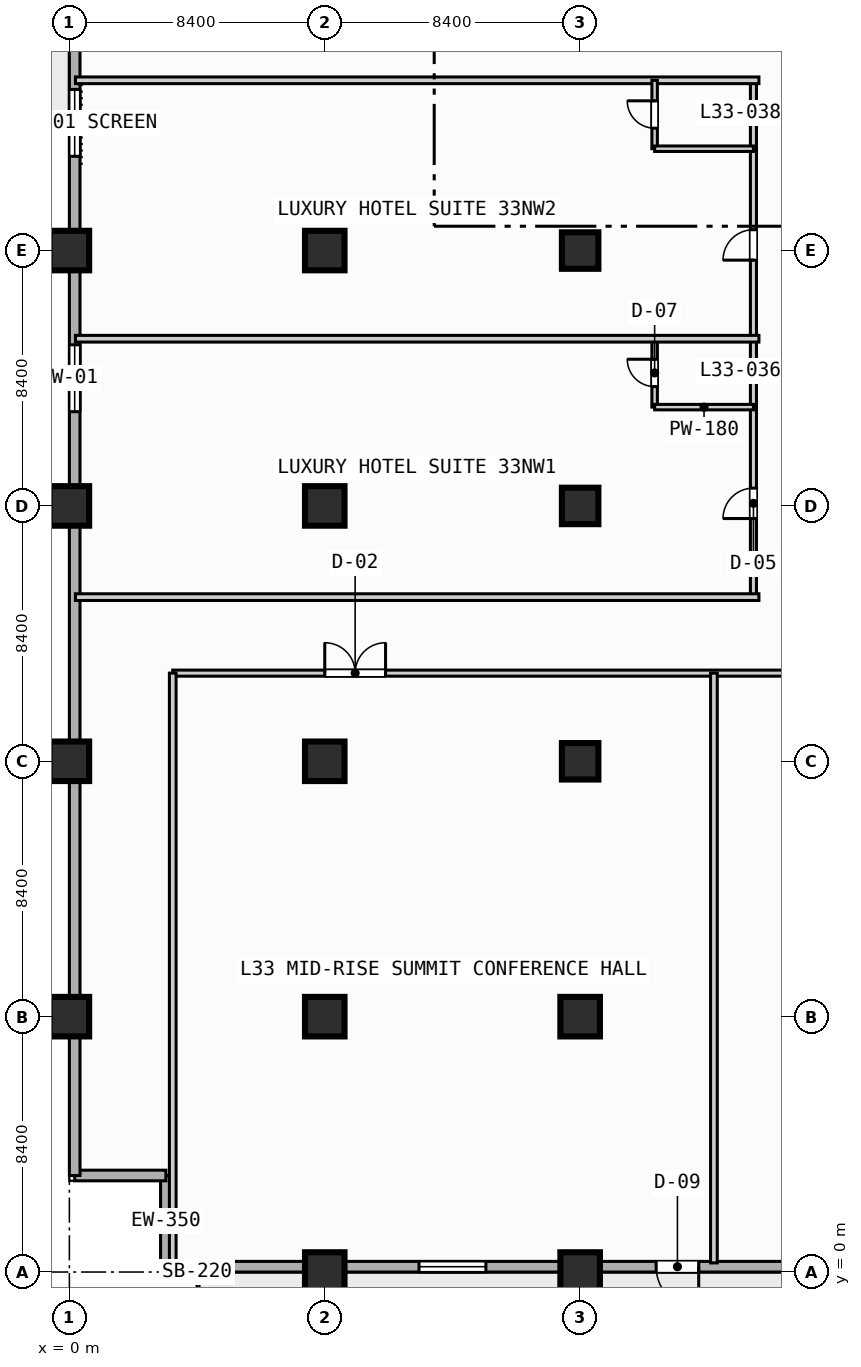
"""IFC4 building model, lengths in metres.
Left out: names, types, materials, properties, quantities, classifications, styles, units other than length and angle.
Written with IfcOpenShell. Run it as: python <this file> out.ifc"""

import sys

from ifc_helpers import new_model, si_unit, direction, frame, frame_2d, origin, origin_2d, place, context, subcontext, project, spatial, rectangle, extrude, element, fill, save


model = new_model("IFC4")
c1 = context("Model", 3, precision=1e-05, world=origin(), true_north=direction((0.0, 1.0)))
c2 = subcontext(c1, "Body", "Model", "MODEL_VIEW")
j1 = project(units=[si_unit("LENGTHUNIT", "METRE"), si_unit("PLANEANGLEUNIT", "RADIAN")], contexts=[c1])
p1 = place(None, origin())
s1 = spatial("IfcSite", under=j1, at=p1, CompositionType="ELEMENT")
p2 = place(p1, origin())
s2 = spatial("IfcBuilding", under=s1, at=p2, CompositionType="ELEMENT")
p3 = place(p2, frame((0.0, 0.0, 138.0)))
s3 = spatial("IfcBuildingStorey", under=s2, at=p3, CompositionType="ELEMENT", Elevation=138.0)
for number, where, z_axis, x_axis in (
    (1, (0.0, 8.4, 0.0), (0.0, 0.0, 1.0), (1.0, 0.0, 0.0)),
    (2, (0.0, 16.8, 0.0), (0.0, 0.0, 1.0), (1.0, 0.0, 0.0)),
    (3, (0.0, 25.2, 0.0), (0.0, 0.0, 1.0), (1.0, 0.0, 0.0)),
    (4, (0.0, 33.6, 0.0), (0.0, 0.0, 1.0), (1.0, 0.0, 0.0)),
    (5, (8.4, 0.0, 0.0), (0.0, 0.0, 1.0), (1.0, 0.0, 0.0)),
    (6, (8.4, 8.4, 0.0), (0.0, 0.0, 1.0), (1.0, 0.0, 0.0)),
    (7, (8.4, 16.8, 0.0), (0.0, 0.0, 1.0), (1.0, 0.0, 0.0)),
    (8, (8.4, 25.2, 0.0), (0.0, 0.0, 1.0), (1.0, 0.0, 0.0)),
    (9, (8.4, 33.6, 0.0), (0.0, 0.0, 1.0), (1.0, 0.0, 0.0)),
    (10, (16.8, 0.0, 0.0), (0.0, 0.0, 1.0), (1.0, 0.0, 0.0)),
    (11, (16.8, 8.4, 0.0), (0.0, 0.0, 1.0), (1.0, 0.0, 0.0)),
):
    element("IfcColumn", number, at=place(p3, frame(where, z_axis=z_axis, x_axis=x_axis)), inside=s3, PredefinedType="COLUMN", context=c2, shape_type="SweptSolid", body=[
        extrude(rectangle(XDim=1.3, YDim=1.3, at=origin_2d()), origin(), (0.0, 0.0, 1.0), 3.8),
    ])
for number, where, z_axis, x_axis in (
    (12, (16.8, 16.8, 0.0), (0.0, 0.0, 1.0), (1.0, 0.0, 0.0)),
    (13, (16.8, 25.2, 0.0), (0.0, 0.0, 1.0), (1.0, 0.0, 0.0)),
    (14, (16.8, 33.6, 0.0), (0.0, 0.0, 1.0), (1.0, 0.0, 0.0)),
):
    element("IfcColumn", number, at=place(p3, frame(where, z_axis=z_axis, x_axis=x_axis)), inside=s3, PredefinedType="COLUMN", context=c2, shape_type="SweptSolid", body=[
        extrude(rectangle(XDim=1.2, YDim=1.2, at=origin_2d()), origin(), (0.0, 0.0, 1.0), 3.8),
    ])
for number, where, z_axis, x_axis in (
    (15, (3.175, 0.175, 0.0), (0.0, 0.0, 1.0), (0.0, 1.0, 0.0)),
    (16, (3.175, 3.175, 0.0), (0.0, 0.0, 1.0), (-1.0, 0.0, 0.0)),
):
    element("IfcWall", number, at=place(p3, frame(where, z_axis=z_axis, x_axis=x_axis)), inside=s3, PredefinedType="STANDARD", context=c2, shape_type="SweptSolid", body=[
        extrude(rectangle(XDim=3.0, YDim=0.35, at=frame_2d((1.5, 0.0))), origin(), (0.0, 0.0, 1.0), 3.55),
    ])
p4 = place(p3, frame((0.175, 3.175, 0.0), z_axis=(0.0, 0.0, 1.0), x_axis=(0.0, 1.0, 0.0)))
e17 = element("IfcWall", 17, at=p4, inside=s3, PredefinedType="STANDARD", context=c2, shape_type="SweptSolid", body=[
    extrude(rectangle(XDim=86.05, YDim=0.35, at=frame_2d((43.025, 0.0))), origin(), (0.0, 0.0, 1.0), 3.55),
])
p5 = place(p4, frame((42.325, 0.0, 0.0)))
e18 = element("IfcOpeningElement", 18, at=p5, cuts=e17, PredefinedType="OPENING", context=c2, shape_type="SweptSolid", body=[
    extrude(rectangle(XDim=1.4, YDim=2.2, at=frame_2d((0.7, 1.1))), frame((0.0, 0.185, 0.0), z_axis=(0.0, -1.0, 0.0), x_axis=(1.0, 0.0, 0.0)), (0.0, 0.0, 1.0), 0.37),
])
p6 = place(p4, frame((25.125, 0.0, 0.85)))
e19 = element("IfcOpeningElement", 19, at=p6, cuts=e17, PredefinedType="OPENING", context=c2, shape_type="SweptSolid", body=[
    extrude(rectangle(XDim=2.2, YDim=1.8, at=frame_2d((1.1, 0.9))), frame((0.0, 0.185, 0.0), z_axis=(0.0, -1.0, 0.0), x_axis=(1.0, 0.0, 0.0)), (0.0, 0.0, 1.0), 0.37),
])
p7 = place(p4, frame((33.525, 0.0, 0.85)))
e20 = element("IfcOpeningElement", 20, at=p7, cuts=e17, PredefinedType="OPENING", context=c2, shape_type="SweptSolid", body=[
    extrude(rectangle(XDim=2.2, YDim=1.8, at=frame_2d((1.1, 0.9))), frame((0.0, 0.185, 0.0), z_axis=(0.0, -1.0, 0.0), x_axis=(1.0, 0.0, 0.0)), (0.0, 0.0, 1.0), 0.37),
])
p8 = place(p3, frame((72.425, 0.175, 0.0), z_axis=(0.0, 0.0, 1.0), x_axis=(-1.0, 0.0, 0.0)))
e21 = element("IfcWall", 21, at=p8, inside=s3, PredefinedType="STANDARD", context=c2, shape_type="SweptSolid", body=[
    extrude(rectangle(XDim=69.25, YDim=0.35, at=frame_2d((34.625, 0.0))), origin(), (0.0, 0.0, 1.0), 3.55),
])
p9 = place(p8, frame((51.725, 0.0, 0.0)))
e22 = element("IfcOpeningElement", 22, at=p9, cuts=e21, PredefinedType="OPENING", context=c2, shape_type="SweptSolid", body=[
    extrude(rectangle(XDim=1.4, YDim=2.2, at=frame_2d((0.7, 1.1))), frame((0.0, 0.185, 0.0), z_axis=(0.0, -1.0, 0.0), x_axis=(1.0, 0.0, 0.0)), (0.0, 0.0, 1.0), 0.37),
])
p10 = place(p8, frame((58.725, 0.0, 0.85)))
e23 = element("IfcOpeningElement", 23, at=p10, cuts=e21, PredefinedType="OPENING", context=c2, shape_type="SweptSolid", body=[
    extrude(rectangle(XDim=2.2, YDim=1.8, at=frame_2d((1.1, 0.9))), frame((0.0, 0.185, 0.0), z_axis=(0.0, -1.0, 0.0), x_axis=(1.0, 0.0, 0.0)), (0.0, 0.0, 1.0), 0.37),
])
p11 = place(p8, frame((41.925, 0.0, 0.85)))
e24 = element("IfcOpeningElement", 24, at=p11, cuts=e21, PredefinedType="OPENING", context=c2, shape_type="SweptSolid", body=[
    extrude(rectangle(XDim=2.2, YDim=1.8, at=frame_2d((1.1, 0.9))), frame((0.0, 0.185, 0.0), z_axis=(0.0, -1.0, 0.0), x_axis=(1.0, 0.0, 0.0)), (0.0, 0.0, 1.0), 0.37),
])
p12 = place(p8, frame((33.525, 0.0, 0.85)))
e25 = element("IfcOpeningElement", 25, at=p12, cuts=e21, PredefinedType="OPENING", context=c2, shape_type="SweptSolid", body=[
    extrude(rectangle(XDim=2.2, YDim=1.8, at=frame_2d((1.1, 0.9))), frame((0.0, 0.185, 0.0), z_axis=(0.0, -1.0, 0.0), x_axis=(1.0, 0.0, 0.0)), (0.0, 0.0, 1.0), 0.37),
])
p13 = place(p8, frame((25.125, 0.0, 0.85)))
e26 = element("IfcOpeningElement", 26, at=p13, cuts=e21, PredefinedType="OPENING", context=c2, shape_type="SweptSolid", body=[
    extrude(rectangle(XDim=2.2, YDim=1.8, at=frame_2d((1.1, 0.9))), frame((0.0, 0.185, 0.0), z_axis=(0.0, -1.0, 0.0), x_axis=(1.0, 0.0, 0.0)), (0.0, 0.0, 1.0), 0.37),
])
p14 = place(p3, frame((3.4, 19.7, 0.0), z_axis=(0.0, 0.0, 1.0), x_axis=(1.0, 0.0, 0.0)))
e27 = element("IfcWall", 27, at=p14, inside=s3, PredefinedType="PARTITIONING", context=c2, shape_type="SweptSolid", body=[
    extrude(rectangle(XDim=35.8, YDim=0.2, at=frame_2d((17.9, 0.0))), origin(), (0.0, 0.0, 1.0), 3.55),
])
p15 = place(p14, frame((5.0, 0.0, 0.0)))
e28 = element("IfcOpeningElement", 28, at=p15, cuts=e27, PredefinedType="OPENING", context=c2, shape_type="SweptSolid", body=[
    extrude(rectangle(XDim=2.0, YDim=2.15, at=frame_2d((1.0, 1.075))), frame((0.0, 0.11, 0.0), z_axis=(0.0, -1.0, 0.0), x_axis=(1.0, 0.0, 0.0)), (0.0, 0.0, 1.0), 0.22),
])
p16 = place(p14, frame((22.0, 0.0, 0.0)))
e29 = element("IfcOpeningElement", 29, at=p16, cuts=e27, PredefinedType="OPENING", context=c2, shape_type="SweptSolid", body=[
    extrude(rectangle(XDim=2.0, YDim=2.15, at=frame_2d((1.0, 1.075))), frame((0.0, 0.11, 0.0), z_axis=(0.0, -1.0, 0.0), x_axis=(1.0, 0.0, 0.0)), (0.0, 0.0, 1.0), 0.22),
])
for number, where, z_axis, x_axis in (
    (30, (3.4, 0.3, 0.0), (0.0, 0.0, 1.0), (0.0, 1.0, 0.0)),
    (31, (21.2, 0.3, 0.0), (0.0, 0.0, 1.0), (0.0, 1.0, 0.0)),
):
    element("IfcWall", number, at=place(p3, frame(where, z_axis=z_axis, x_axis=x_axis)), inside=s3, PredefinedType="PARTITIONING", context=c2, shape_type="SweptSolid", body=[
        extrude(rectangle(XDim=19.4, YDim=0.22, at=frame_2d((9.7, 0.0))), origin(), (0.0, 0.0, 1.0), 3.55),
    ])
p17 = place(p3, frame((22.5, 22.2, 0.0), z_axis=(0.0, 0.0, 1.0), x_axis=(0.0, 1.0, 0.0)))
e32 = element("IfcWall", 32, at=p17, inside=s3, PredefinedType="PARTITIONING", context=c2, shape_type="SweptSolid", body=[
    extrude(rectangle(XDim=17.0, YDim=0.2, at=frame_2d((8.5, 0.0))), origin(), (0.0, 0.0, 1.0), 3.55),
])
p18 = place(p17, frame((2.585, 0.0, 0.0)))
e33 = element("IfcOpeningElement", 33, at=p18, cuts=e32, PredefinedType="OPENING", context=c2, shape_type="SweptSolid", body=[
    extrude(rectangle(XDim=1.0, YDim=2.15, at=frame_2d((0.5, 1.075))), frame((0.0, 0.11, 0.0), z_axis=(0.0, -1.0, 0.0), x_axis=(1.0, 0.0, 0.0)), (0.0, 0.0, 1.0), 0.22),
])
p19 = place(p17, frame((11.085, 0.0, 0.0)))
e34 = element("IfcOpeningElement", 34, at=p19, cuts=e32, PredefinedType="OPENING", context=c2, shape_type="SweptSolid", body=[
    extrude(rectangle(XDim=1.0, YDim=2.15, at=frame_2d((0.5, 1.075))), frame((0.0, 0.11, 0.0), z_axis=(0.0, -1.0, 0.0), x_axis=(1.0, 0.0, 0.0)), (0.0, 0.0, 1.0), 0.22),
])
p20 = place(p3, frame((0.2, 22.2, 0.0), z_axis=(0.0, 0.0, 1.0), x_axis=(1.0, 0.0, 0.0)))
e35 = element("IfcWall", 35, at=p20, inside=s3, PredefinedType="PARTITIONING", context=c2, shape_type="SweptSolid", body=[
    extrude(rectangle(XDim=22.48, YDim=0.22, at=frame_2d((11.24, 0.0))), origin(), (0.0, 0.0, 1.0), 3.55),
])
p21 = place(p3, frame((19.25, 28.45, 0.0), z_axis=(0.0, 0.0, 1.0), x_axis=(0.0, 1.0, 0.0)))
e36 = element("IfcWall", 36, at=p21, inside=s3, PredefinedType="PLUMBINGWALL", context=c2, shape_type="SweptSolid", body=[
    extrude(rectangle(XDim=2.25, YDim=0.18, at=frame_2d((1.125, 0.0))), origin(), (0.0, 0.0, 1.0), 3.55),
])
p22 = place(p21, frame((0.675, 0.0, 0.0)))
e37 = element("IfcOpeningElement", 37, at=p22, cuts=e36, PredefinedType="OPENING", context=c2, shape_type="SweptSolid", body=[
    extrude(rectangle(XDim=0.9, YDim=2.1, at=frame_2d((0.45, 1.05))), frame((0.0, 0.1, 0.0), z_axis=(0.0, -1.0, 0.0), x_axis=(1.0, 0.0, 0.0)), (0.0, 0.0, 1.0), 0.2),
])
p23 = place(p3, frame((19.25, 28.45, 0.0), z_axis=(0.0, 0.0, 1.0), x_axis=(1.0, 0.0, 0.0)))
e38 = element("IfcWall", 38, at=p23, inside=s3, PredefinedType="PLUMBINGWALL", context=c2, shape_type="SweptSolid", body=[
    extrude(rectangle(XDim=3.25, YDim=0.18, at=frame_2d((1.625, 0.0))), origin(), (0.0, 0.0, 1.0), 3.55),
])
for number, where, z_axis, x_axis in (
    (39, (0.2, 30.7, 0.0), (0.0, 0.0, 1.0), (1.0, 0.0, 0.0)),
    (40, (0.2, 39.2, 0.0), (0.0, 0.0, 1.0), (1.0, 0.0, 0.0)),
):
    element("IfcWall", number, at=place(p3, frame(where, z_axis=z_axis, x_axis=x_axis)), inside=s3, PredefinedType="PARTITIONING", context=c2, shape_type="SweptSolid", body=[
        extrude(rectangle(XDim=22.48, YDim=0.22, at=frame_2d((11.24, 0.0))), origin(), (0.0, 0.0, 1.0), 3.55),
    ])
p24 = place(p3, frame((19.25, 36.95, 0.0), z_axis=(0.0, 0.0, 1.0), x_axis=(0.0, 1.0, 0.0)))
e41 = element("IfcWall", 41, at=p24, inside=s3, PredefinedType="PLUMBINGWALL", context=c2, shape_type="SweptSolid", body=[
    extrude(rectangle(XDim=2.25, YDim=0.18, at=frame_2d((1.125, 0.0))), origin(), (0.0, 0.0, 1.0), 3.55),
])
p25 = place(p24, frame((0.675, 0.0, 0.0)))
e42 = element("IfcOpeningElement", 42, at=p25, cuts=e41, PredefinedType="OPENING", context=c2, shape_type="SweptSolid", body=[
    extrude(rectangle(XDim=0.9, YDim=2.1, at=frame_2d((0.45, 1.05))), frame((0.0, 0.1, 0.0), z_axis=(0.0, -1.0, 0.0), x_axis=(1.0, 0.0, 0.0)), (0.0, 0.0, 1.0), 0.2),
])
p26 = place(p3, frame((19.25, 36.95, 0.0), z_axis=(0.0, 0.0, 1.0), x_axis=(1.0, 0.0, 0.0)))
e43 = element("IfcWall", 43, at=p26, inside=s3, PredefinedType="PLUMBINGWALL", context=c2, shape_type="SweptSolid", body=[
    extrude(rectangle(XDim=3.25, YDim=0.18, at=frame_2d((1.625, 0.0))), origin(), (0.0, 0.0, 1.0), 3.55),
])
p27 = place(p6, origin())
e44 = element("IfcWindow", 44, at=p27, inside=s3, PartitioningType="SINGLE_PANEL", PredefinedType="WINDOW", context=c2, shape_type="SweptSolid", body=[
    extrude(rectangle(XDim=2.2, YDim=1.8, at=frame_2d((1.1, 0.9))), frame((0.0, 0.03, 0.0), z_axis=(0.0, -1.0, 0.0), x_axis=(1.0, 0.0, 0.0)), (0.0, 0.0, 1.0), 0.06),
])
fill(e19, e44)
p28 = place(p7, origin())
e45 = element("IfcWindow", 45, at=p28, inside=s3, PartitioningType="SINGLE_PANEL", PredefinedType="WINDOW", context=c2, shape_type="SweptSolid", body=[
    extrude(rectangle(XDim=2.2, YDim=1.8, at=frame_2d((1.1, 0.9))), frame((0.0, 0.03, 0.0), z_axis=(0.0, -1.0, 0.0), x_axis=(1.0, 0.0, 0.0)), (0.0, 0.0, 1.0), 0.06),
])
fill(e20, e45)
p29 = place(p9, origin())
e46 = element("IfcDoor", 46, at=p29, inside=s3, OperationType="SINGLE_SWING_LEFT", PredefinedType="DOOR", context=c2, shape_type="SweptSolid", body=[
    extrude(rectangle(XDim=1.4, YDim=2.2, at=frame_2d((0.7, 1.1))), frame((0.0, 0.025, 0.0), z_axis=(0.0, -1.0, 0.0), x_axis=(1.0, 0.0, 0.0)), (0.0, 0.0, 1.0), 0.05),
])
fill(e22, e46)
p30 = place(p10, origin())
e47 = element("IfcWindow", 47, at=p30, inside=s3, PartitioningType="SINGLE_PANEL", PredefinedType="WINDOW", context=c2, shape_type="SweptSolid", body=[
    extrude(rectangle(XDim=2.2, YDim=1.8, at=frame_2d((1.1, 0.9))), frame((0.0, 0.03, 0.0), z_axis=(0.0, -1.0, 0.0), x_axis=(1.0, 0.0, 0.0)), (0.0, 0.0, 1.0), 0.06),
])
fill(e23, e47)
p31 = place(p15, origin())
e48 = element("IfcDoor", 48, at=p31, inside=s3, OperationType="SINGLE_SWING_LEFT", PredefinedType="DOOR", context=c2, shape_type="SweptSolid", body=[
    extrude(rectangle(XDim=2.0, YDim=2.15, at=frame_2d((1.0, 1.075))), frame((0.0, 0.025, 0.0), z_axis=(0.0, -1.0, 0.0), x_axis=(1.0, 0.0, 0.0)), (0.0, 0.0, 1.0), 0.05),
])
fill(e28, e48)
p32 = place(p18, origin())
e49 = element("IfcDoor", 49, at=p32, inside=s3, OperationType="SINGLE_SWING_LEFT", PredefinedType="DOOR", context=c2, shape_type="SweptSolid", body=[
    extrude(rectangle(XDim=1.0, YDim=2.15, at=frame_2d((0.5, 1.075))), frame((0.0, 0.025, 0.0), z_axis=(0.0, -1.0, 0.0), x_axis=(1.0, 0.0, 0.0)), (0.0, 0.0, 1.0), 0.05),
])
fill(e33, e49)
p33 = place(p19, origin())
e50 = element("IfcDoor", 50, at=p33, inside=s3, OperationType="SINGLE_SWING_LEFT", PredefinedType="DOOR", context=c2, shape_type="SweptSolid", body=[
    extrude(rectangle(XDim=1.0, YDim=2.15, at=frame_2d((0.5, 1.075))), frame((0.0, 0.025, 0.0), z_axis=(0.0, -1.0, 0.0), x_axis=(1.0, 0.0, 0.0)), (0.0, 0.0, 1.0), 0.05),
])
fill(e34, e50)
p34 = place(p22, origin())
e51 = element("IfcDoor", 51, at=p34, inside=s3, OperationType="SINGLE_SWING_RIGHT", PredefinedType="DOOR", context=c2, shape_type="SweptSolid", body=[
    extrude(rectangle(XDim=0.9, YDim=2.1, at=frame_2d((0.45, 1.05))), frame((0.0, 0.025, 0.0), z_axis=(0.0, -1.0, 0.0), x_axis=(1.0, 0.0, 0.0)), (0.0, 0.0, 1.0), 0.05),
])
fill(e37, e51)
p35 = place(p25, origin())
e52 = element("IfcDoor", 52, at=p35, inside=s3, OperationType="SINGLE_SWING_RIGHT", PredefinedType="DOOR", context=c2, shape_type="SweptSolid", body=[
    extrude(rectangle(XDim=0.9, YDim=2.1, at=frame_2d((0.45, 1.05))), frame((0.0, 0.025, 0.0), z_axis=(0.0, -1.0, 0.0), x_axis=(1.0, 0.0, 0.0)), (0.0, 0.0, 1.0), 0.05),
])
fill(e42, e52)
save(model, sys.argv[1])
